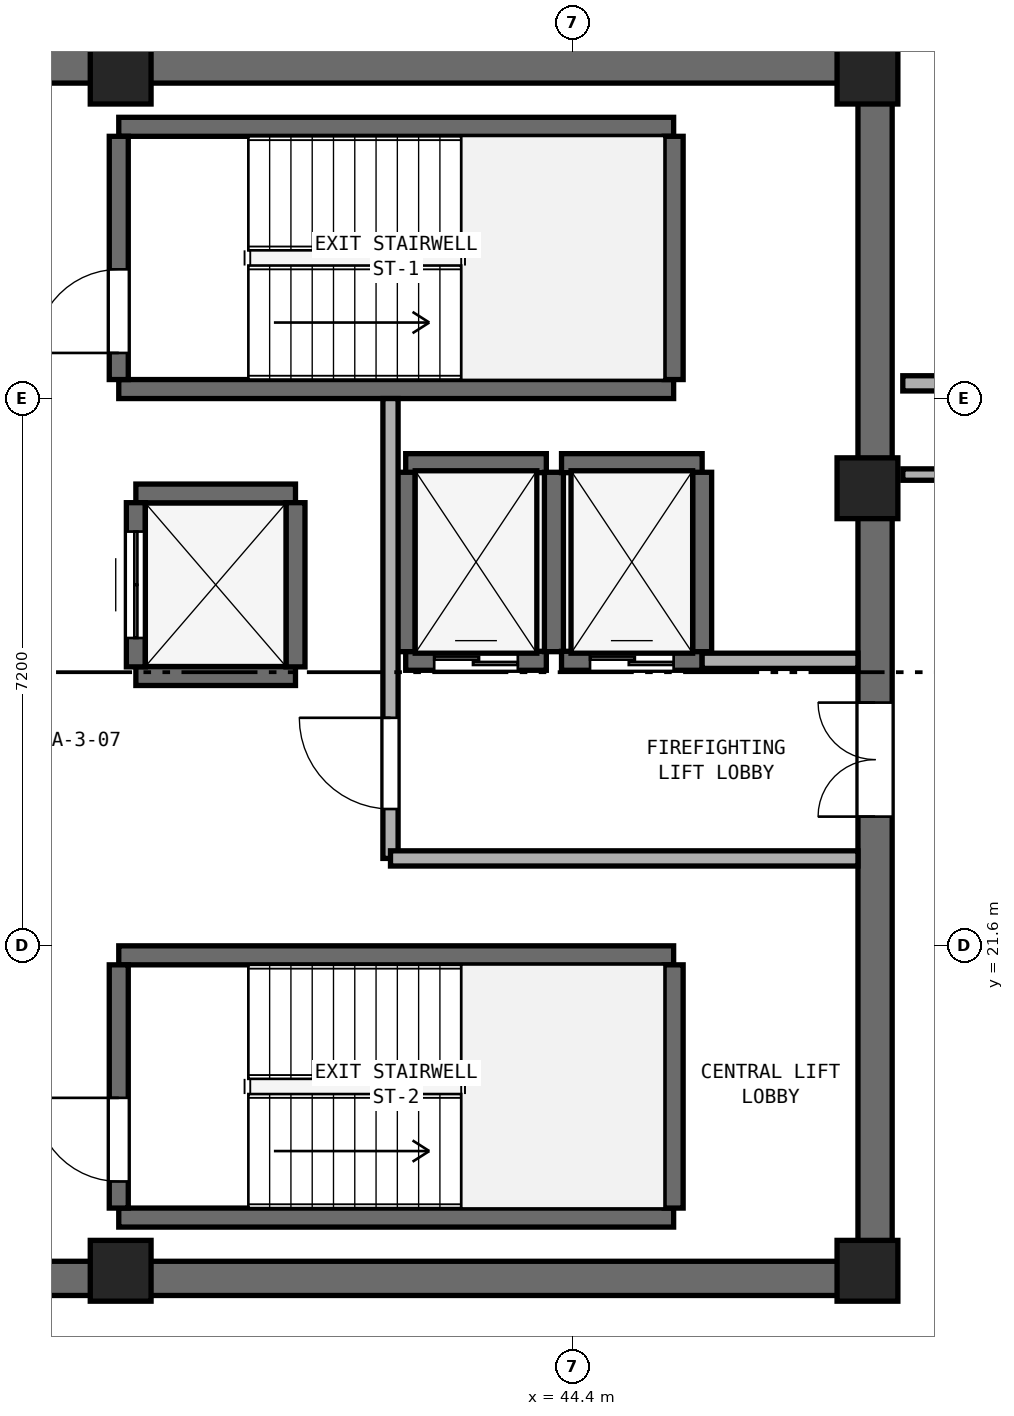
"""IFC4 building model, lengths in metres.
Left out: names, types, materials, properties, quantities, classifications, styles, units other than length and angle.
Written with IfcOpenShell. Run it as: python <this file> out.ifc"""

import sys

from ifc_helpers import new_model, si_unit, direction, frame, frame_2d, origin, origin_2d, place, context, subcontext, project, spatial, rectangle, extrude, element, fill, save


model = new_model("IFC4")
c1 = context("Model", 3, precision=1e-05, world=origin(), true_north=direction((0.0, 1.0)))
c2 = subcontext(c1, "Body", "Model", "MODEL_VIEW")
j1 = project(units=[si_unit("LENGTHUNIT", "METRE"), si_unit("PLANEANGLEUNIT", "RADIAN")], contexts=[c1])
p1 = place(None, origin())
s1 = spatial("IfcSite", under=j1, at=p1, CompositionType="ELEMENT")
p2 = place(p1, origin())
s2 = spatial("IfcBuilding", under=s1, at=p2, CompositionType="ELEMENT")
p3 = place(p2, frame((0.0, 0.0, 259.2)))
s3 = spatial("IfcBuildingStorey", under=s2, at=p3, CompositionType="ELEMENT", Elevation=259.2)
for number, where, z_axis, x_axis in (
    (1, (25.4, 17.225, 0.0), (0.0, 0.0, 1.0), (1.0, 0.0, 0.0)),
    (2, (25.4, 33.175, 0.0), (0.0, 0.0, 1.0), (1.0, 0.0, 0.0)),
):
    element("IfcWall", number, at=place(p3, frame(where, z_axis=z_axis, x_axis=x_axis)), inside=s3, PredefinedType="SHEAR", context=c2, shape_type="SweptSolid", body=[
        extrude(rectangle(XDim=23.2, YDim=0.45, at=frame_2d((11.6, 0.0))), origin(), (0.0, 0.0, 1.0), 3.51),
    ])
p4 = place(p3, frame((48.375, 17.45, 0.0), z_axis=(0.0, 0.0, 1.0), x_axis=(0.0, 1.0, 0.0)))
e3 = element("IfcWall", 3, at=p4, inside=s3, PredefinedType="SHEAR", context=c2, shape_type="SweptSolid", body=[
    extrude(rectangle(XDim=15.5, YDim=0.45, at=frame_2d((7.75, 0.0))), origin(), (0.0, 0.0, 1.0), 3.51),
])
p5 = place(p4, frame((5.85, 0.0, 0.0)))
e4 = element("IfcOpeningElement", 4, at=p5, cuts=e3, PredefinedType="OPENING", context=c2, shape_type="SweptSolid", body=[
    extrude(rectangle(XDim=1.5, YDim=2.15, at=frame_2d((0.75, 1.075))), frame((0.0, 0.235, 0.0), z_axis=(0.0, -1.0, 0.0), x_axis=(1.0, 0.0, 0.0)), (0.0, 0.0, 1.0), 0.47),
])
for number, where, z_axis, x_axis in (
    (5, (38.45, 17.325, 0.0), (0.0, 0.0, 1.0), (1.0, 0.0, 0.0)),
    (6, (48.275, 17.325, 0.0), (0.0, 0.0, 1.0), (1.0, 0.0, 0.0)),
    (7, (48.275, 27.62, 0.0), (0.0, 0.0, 1.0), (1.0, 0.0, 0.0)),
    (8, (48.275, 33.075, 0.0), (0.0, 0.0, 1.0), (1.0, 0.0, 0.0)),
    (9, (38.45, 33.075, 0.0), (0.0, 0.0, 1.0), (1.0, 0.0, 0.0)),
):
    element("IfcColumn", number, at=place(p3, frame(where, z_axis=z_axis, x_axis=x_axis)), inside=s3, PredefinedType="PILASTER", context=c2, shape_type="SweptSolid", body=[
        extrude(rectangle(XDim=0.8, YDim=0.8, at=origin_2d()), origin(), (0.0, 0.0, 1.0), 3.8),
    ])
for number, where, z_axis, x_axis in (
    (10, (38.425, 28.925, 0.0), (0.0, 0.0, 1.0), (1.0, 0.0, 0.0)),
    (11, (38.425, 32.375, 0.0), (0.0, 0.0, 1.0), (1.0, 0.0, 0.0)),
):
    element("IfcWall", number, at=place(p3, frame(where, z_axis=z_axis, x_axis=x_axis)), inside=s3, PredefinedType="SHEAR", context=c2, shape_type="SweptSolid", body=[
        extrude(rectangle(XDim=7.3, YDim=0.25, at=frame_2d((3.65, 0.0))), origin(), (0.0, 0.0, 1.0), 3.51),
    ])
p6 = place(p3, frame((38.425, 29.05, 0.0), z_axis=(0.0, 0.0, 1.0), x_axis=(0.0, 1.0, 0.0)))
e12 = element("IfcWall", 12, at=p6, inside=s3, PredefinedType="SHEAR", context=c2, shape_type="SweptSolid", body=[
    extrude(rectangle(XDim=3.2, YDim=0.25, at=frame_2d((1.6, 0.0))), origin(), (0.0, 0.0, 1.0), 3.51),
])
p7 = place(p6, frame((0.35, 0.0, 0.0)))
e13 = element("IfcOpeningElement", 13, at=p7, cuts=e12, PredefinedType="OPENING", context=c2, shape_type="SweptSolid", body=[
    extrude(rectangle(XDim=1.1, YDim=2.15, at=frame_2d((0.55, 1.075))), frame((0.0, 0.135, 0.0), z_axis=(0.0, -1.0, 0.0), x_axis=(1.0, 0.0, 0.0)), (0.0, 0.0, 1.0), 0.27),
])
p8 = place(p3, frame((45.725, 29.05, 0.0), z_axis=(0.0, 0.0, 1.0), x_axis=(0.0, 1.0, 0.0)))
e14 = element("IfcWall", 14, at=p8, inside=s3, PredefinedType="SHEAR", context=c2, shape_type="SweptSolid", body=[
    extrude(rectangle(XDim=3.2, YDim=0.25, at=frame_2d((1.6, 0.0))), origin(), (0.0, 0.0, 1.0), 3.51),
])
for number, where, z_axis, x_axis in (
    (15, (38.425, 18.025, 0.0), (0.0, 0.0, 1.0), (1.0, 0.0, 0.0)),
    (16, (38.425, 21.475, 0.0), (0.0, 0.0, 1.0), (1.0, 0.0, 0.0)),
):
    element("IfcWall", number, at=place(p3, frame(where, z_axis=z_axis, x_axis=x_axis)), inside=s3, PredefinedType="SHEAR", context=c2, shape_type="SweptSolid", body=[
        extrude(rectangle(XDim=7.3, YDim=0.25, at=frame_2d((3.65, 0.0))), origin(), (0.0, 0.0, 1.0), 3.51),
    ])
p9 = place(p3, frame((38.425, 18.15, 0.0), z_axis=(0.0, 0.0, 1.0), x_axis=(0.0, 1.0, 0.0)))
e17 = element("IfcWall", 17, at=p9, inside=s3, PredefinedType="SHEAR", context=c2, shape_type="SweptSolid", body=[
    extrude(rectangle(XDim=3.2, YDim=0.25, at=frame_2d((1.6, 0.0))), origin(), (0.0, 0.0, 1.0), 3.51),
])
p10 = place(p9, frame((0.35, 0.0, 0.0)))
e18 = element("IfcOpeningElement", 18, at=p10, cuts=e17, PredefinedType="OPENING", context=c2, shape_type="SweptSolid", body=[
    extrude(rectangle(XDim=1.1, YDim=2.15, at=frame_2d((0.55, 1.075))), frame((0.0, 0.135, 0.0), z_axis=(0.0, -1.0, 0.0), x_axis=(1.0, 0.0, 0.0)), (0.0, 0.0, 1.0), 0.27),
])
p11 = place(p3, frame((45.725, 18.15, 0.0), z_axis=(0.0, 0.0, 1.0), x_axis=(0.0, 1.0, 0.0)))
e19 = element("IfcWall", 19, at=p11, inside=s3, PredefinedType="SHEAR", context=c2, shape_type="SweptSolid", body=[
    extrude(rectangle(XDim=3.2, YDim=0.25, at=frame_2d((1.6, 0.0))), origin(), (0.0, 0.0, 1.0), 3.51),
])
p12 = place(p3, frame((42.2, 25.35, 0.0), z_axis=(0.0, 0.0, 1.0), x_axis=(1.0, 0.0, 0.0)))
e20 = element("IfcWall", 20, at=p12, inside=s3, PredefinedType="SHEAR", context=c2, shape_type="SweptSolid", body=[
    extrude(rectangle(XDim=1.85, YDim=0.25, at=frame_2d((0.925, 0.0))), origin(), (0.0, 0.0, 1.0), 3.51),
])
p13 = place(p12, frame((0.375, 0.0, 0.0)))
e21 = element("IfcOpeningElement", 21, at=p13, cuts=e20, PredefinedType="OPENING", context=c2, shape_type="SweptSolid", body=[
    extrude(rectangle(XDim=1.1, YDim=2.15, at=frame_2d((0.55, 1.075))), frame((0.0, 0.135, 0.0), z_axis=(0.0, -1.0, 0.0), x_axis=(1.0, 0.0, 0.0)), (0.0, 0.0, 1.0), 0.27),
])
p14 = place(p3, frame((42.2, 27.95, 0.0), z_axis=(0.0, 0.0, 1.0), x_axis=(1.0, 0.0, 0.0)))
e22 = element("IfcWall", 22, at=p14, inside=s3, PredefinedType="SHEAR", context=c2, shape_type="SweptSolid", body=[
    extrude(rectangle(XDim=1.85, YDim=0.25, at=frame_2d((0.925, 0.0))), origin(), (0.0, 0.0, 1.0), 3.51),
])
for number, where, z_axis, x_axis in (
    (23, (42.2, 25.47, 0.0), (0.0, 0.0, 1.0), (0.0, 1.0, 0.0)),
    (24, (44.15, 25.47, 0.0), (0.0, 0.0, 1.0), (0.0, 1.0, 0.0)),
):
    element("IfcWall", number, at=place(p3, frame(where, z_axis=z_axis, x_axis=x_axis)), inside=s3, PredefinedType="SHEAR", context=c2, shape_type="SweptSolid", body=[
        extrude(rectangle(XDim=2.36, YDim=0.25, at=frame_2d((1.18, 0.0))), origin(), (0.0, 0.0, 1.0), 3.51),
    ])
p15 = place(p3, frame((44.25, 25.35, 0.0), z_axis=(0.0, 0.0, 1.0), x_axis=(1.0, 0.0, 0.0)))
e25 = element("IfcWall", 25, at=p15, inside=s3, PredefinedType="SHEAR", context=c2, shape_type="SweptSolid", body=[
    extrude(rectangle(XDim=1.85, YDim=0.25, at=frame_2d((0.925, 0.0))), origin(), (0.0, 0.0, 1.0), 3.51),
])
p16 = place(p15, frame((0.375, 0.0, 0.0)))
e26 = element("IfcOpeningElement", 26, at=p16, cuts=e25, PredefinedType="OPENING", context=c2, shape_type="SweptSolid", body=[
    extrude(rectangle(XDim=1.1, YDim=2.15, at=frame_2d((0.55, 1.075))), frame((0.0, 0.135, 0.0), z_axis=(0.0, -1.0, 0.0), x_axis=(1.0, 0.0, 0.0)), (0.0, 0.0, 1.0), 0.27),
])
p17 = place(p3, frame((44.25, 27.95, 0.0), z_axis=(0.0, 0.0, 1.0), x_axis=(1.0, 0.0, 0.0)))
e27 = element("IfcWall", 27, at=p17, inside=s3, PredefinedType="SHEAR", context=c2, shape_type="SweptSolid", body=[
    extrude(rectangle(XDim=1.85, YDim=0.25, at=frame_2d((0.925, 0.0))), origin(), (0.0, 0.0, 1.0), 3.51),
])
p18 = place(p3, frame((46.1, 25.47, 0.0), z_axis=(0.0, 0.0, 1.0), x_axis=(0.0, 1.0, 0.0)))
e28 = element("IfcWall", 28, at=p18, inside=s3, PredefinedType="SHEAR", context=c2, shape_type="SweptSolid", body=[
    extrude(rectangle(XDim=2.36, YDim=0.25, at=frame_2d((1.18, 0.0))), origin(), (0.0, 0.0, 1.0), 3.51),
])
for number, where, z_axis, x_axis in (
    (29, (38.65, 25.15, 0.0), (0.0, 0.0, 1.0), (1.0, 0.0, 0.0)),
    (30, (38.65, 27.55, 0.0), (0.0, 0.0, 1.0), (1.0, 0.0, 0.0)),
):
    element("IfcWall", number, at=place(p3, frame(where, z_axis=z_axis, x_axis=x_axis)), inside=s3, PredefinedType="SHEAR", context=c2, shape_type="SweptSolid", body=[
        extrude(rectangle(XDim=2.1, YDim=0.25, at=frame_2d((1.05, 0.0))), origin(), (0.0, 0.0, 1.0), 3.51),
    ])
p19 = place(p3, frame((38.65, 25.27, 0.0), z_axis=(0.0, 0.0, 1.0), x_axis=(0.0, 1.0, 0.0)))
e31 = element("IfcWall", 31, at=p19, inside=s3, PredefinedType="SHEAR", context=c2, shape_type="SweptSolid", body=[
    extrude(rectangle(XDim=2.16, YDim=0.25, at=frame_2d((1.08, 0.0))), origin(), (0.0, 0.0, 1.0), 3.51),
])
p20 = place(p19, frame((0.38, 0.0, 0.0)))
e32 = element("IfcOpeningElement", 32, at=p20, cuts=e31, PredefinedType="OPENING", context=c2, shape_type="SweptSolid", body=[
    extrude(rectangle(XDim=1.4, YDim=2.2, at=frame_2d((0.7, 1.1))), frame((0.0, 0.135, 0.0), z_axis=(0.0, -1.0, 0.0), x_axis=(1.0, 0.0, 0.0)), (0.0, 0.0, 1.0), 0.27),
])
p21 = place(p3, frame((40.75, 25.27, 0.0), z_axis=(0.0, 0.0, 1.0), x_axis=(0.0, 1.0, 0.0)))
e33 = element("IfcWall", 33, at=p21, inside=s3, PredefinedType="SHEAR", context=c2, shape_type="SweptSolid", body=[
    extrude(rectangle(XDim=2.16, YDim=0.25, at=frame_2d((1.08, 0.0))), origin(), (0.0, 0.0, 1.0), 3.51),
])
p22 = place(p3, frame((42.0, 22.75, 0.0), z_axis=(0.0, 0.0, 1.0), x_axis=(0.0, 1.0, 0.0)))
e34 = element("IfcWall", 34, at=p22, inside=s3, PredefinedType="SOLIDWALL", context=c2, shape_type="SweptSolid", body=[
    extrude(rectangle(XDim=6.05, YDim=0.2, at=frame_2d((3.025, 0.0))), origin(), (0.0, 0.0, 1.0), 3.51),
])
p23 = place(p22, frame((0.65, 0.0, 0.0)))
e35 = element("IfcOpeningElement", 35, at=p23, cuts=e34, PredefinedType="OPENING", context=c2, shape_type="SweptSolid", body=[
    extrude(rectangle(XDim=1.2, YDim=2.15, at=frame_2d((0.6, 1.075))), frame((0.0, 0.11, 0.0), z_axis=(0.0, -1.0, 0.0), x_axis=(1.0, 0.0, 0.0)), (0.0, 0.0, 1.0), 0.22),
])
p24 = place(p3, frame((42.0, 22.75, 0.0), z_axis=(0.0, 0.0, 1.0), x_axis=(1.0, 0.0, 0.0)))
e36 = element("IfcWall", 36, at=p24, inside=s3, PredefinedType="SOLIDWALL", context=c2, shape_type="SweptSolid", body=[
    extrude(rectangle(XDim=6.15, YDim=0.2, at=frame_2d((3.075, 0.0))), origin(), (0.0, 0.0, 1.0), 3.51),
])
p25 = place(p3, frame((46.1, 25.35, 0.0), z_axis=(0.0, 0.0, 1.0), x_axis=(1.0, 0.0, 0.0)))
e37 = element("IfcWall", 37, at=p25, inside=s3, PredefinedType="SOLIDWALL", context=c2, shape_type="SweptSolid", body=[
    extrude(rectangle(XDim=2.05, YDim=0.2, at=frame_2d((1.025, 0.0))), origin(), (0.0, 0.0, 1.0), 3.51),
])
p26 = place(p3, frame((48.74, 27.8, 0.0), z_axis=(0.0, 0.0, 1.0), x_axis=(1.0, 0.0, 0.0)))
e38 = element("IfcWall", 38, at=p26, inside=s3, PredefinedType="PARTITIONING", context=c2, shape_type="SweptSolid", body=[
    extrude(rectangle(XDim=2.41, YDim=0.15, at=frame_2d((1.205, 0.0))), origin(), (0.0, 0.0, 1.0), 3.51),
])
p27 = place(p3, frame((48.74, 29.0, 0.0), z_axis=(0.0, 0.0, 1.0), x_axis=(1.0, 0.0, 0.0)))
e39 = element("IfcWall", 39, at=p27, inside=s3, PredefinedType="PARTITIONING", context=c2, shape_type="SweptSolid", body=[
    extrude(rectangle(XDim=16.555, YDim=0.2, at=frame_2d((8.277, 0.0))), origin(), (0.0, 0.0, 1.0), 3.51),
])
p28 = place(p7, origin())
e40 = element("IfcDoor", 40, at=p28, inside=s3, OperationType="SINGLE_SWING_LEFT", PredefinedType="DOOR", context=c2, shape_type="SweptSolid", body=[
    extrude(rectangle(XDim=1.1, YDim=2.15, at=frame_2d((0.55, 1.075))), frame((0.0, 0.025, 0.0), z_axis=(0.0, -1.0, 0.0), x_axis=(1.0, 0.0, 0.0)), (0.0, 0.0, 1.0), 0.05),
])
fill(e13, e40)
p29 = place(p10, origin())
e41 = element("IfcDoor", 41, at=p29, inside=s3, OperationType="SINGLE_SWING_RIGHT", PredefinedType="DOOR", context=c2, shape_type="SweptSolid", body=[
    extrude(rectangle(XDim=1.1, YDim=2.15, at=frame_2d((0.55, 1.075))), frame((0.0, 0.025, 0.0), z_axis=(0.0, -1.0, 0.0), x_axis=(1.0, 0.0, 0.0)), (0.0, 0.0, 1.0), 0.05),
])
fill(e18, e41)
p30 = place(p13, origin())
e42 = element("IfcDoor", 42, at=p30, inside=s3, OperationType="DOUBLE_DOOR_SLIDING", PredefinedType="DOOR", context=c2, shape_type="SweptSolid", body=[
    extrude(rectangle(XDim=1.1, YDim=2.15, at=frame_2d((0.55, 1.075))), frame((0.0, 0.025, 0.0), z_axis=(0.0, -1.0, 0.0), x_axis=(1.0, 0.0, 0.0)), (0.0, 0.0, 1.0), 0.05),
])
fill(e21, e42)
p31 = place(p16, origin())
e43 = element("IfcDoor", 43, at=p31, inside=s3, OperationType="DOUBLE_DOOR_SLIDING", PredefinedType="DOOR", context=c2, shape_type="SweptSolid", body=[
    extrude(rectangle(XDim=1.1, YDim=2.15, at=frame_2d((0.55, 1.075))), frame((0.0, 0.025, 0.0), z_axis=(0.0, -1.0, 0.0), x_axis=(1.0, 0.0, 0.0)), (0.0, 0.0, 1.0), 0.05),
])
fill(e26, e43)
p32 = place(p20, origin())
e44 = element("IfcDoor", 44, at=p32, inside=s3, OperationType="DOUBLE_DOOR_SLIDING", PredefinedType="DOOR", context=c2, shape_type="SweptSolid", body=[
    extrude(rectangle(XDim=1.4, YDim=2.2, at=frame_2d((0.7, 1.1))), frame((0.0, 0.025, 0.0), z_axis=(0.0, -1.0, 0.0), x_axis=(1.0, 0.0, 0.0)), (0.0, 0.0, 1.0), 0.05),
])
fill(e32, e44)
p33 = place(p23, origin())
e45 = element("IfcDoor", 45, at=p33, inside=s3, OperationType="SINGLE_SWING_RIGHT", PredefinedType="DOOR", context=c2, shape_type="SweptSolid", body=[
    extrude(rectangle(XDim=1.2, YDim=2.15, at=frame_2d((0.6, 1.075))), frame((0.0, 0.025, 0.0), z_axis=(0.0, -1.0, 0.0), x_axis=(1.0, 0.0, 0.0)), (0.0, 0.0, 1.0), 0.05),
])
fill(e35, e45)
p34 = place(p5, origin())
e46 = element("IfcDoor", 46, at=p34, inside=s3, OperationType="DOUBLE_DOOR_SINGLE_SWING", PredefinedType="DOOR", context=c2, shape_type="SweptSolid", body=[
    extrude(rectangle(XDim=1.5, YDim=2.15, at=frame_2d((0.75, 1.075))), frame((0.0, 0.025, 0.0), z_axis=(0.0, -1.0, 0.0), x_axis=(1.0, 0.0, 0.0)), (0.0, 0.0, 1.0), 0.05),
])
fill(e4, e46)
save(model, sys.argv[1])
